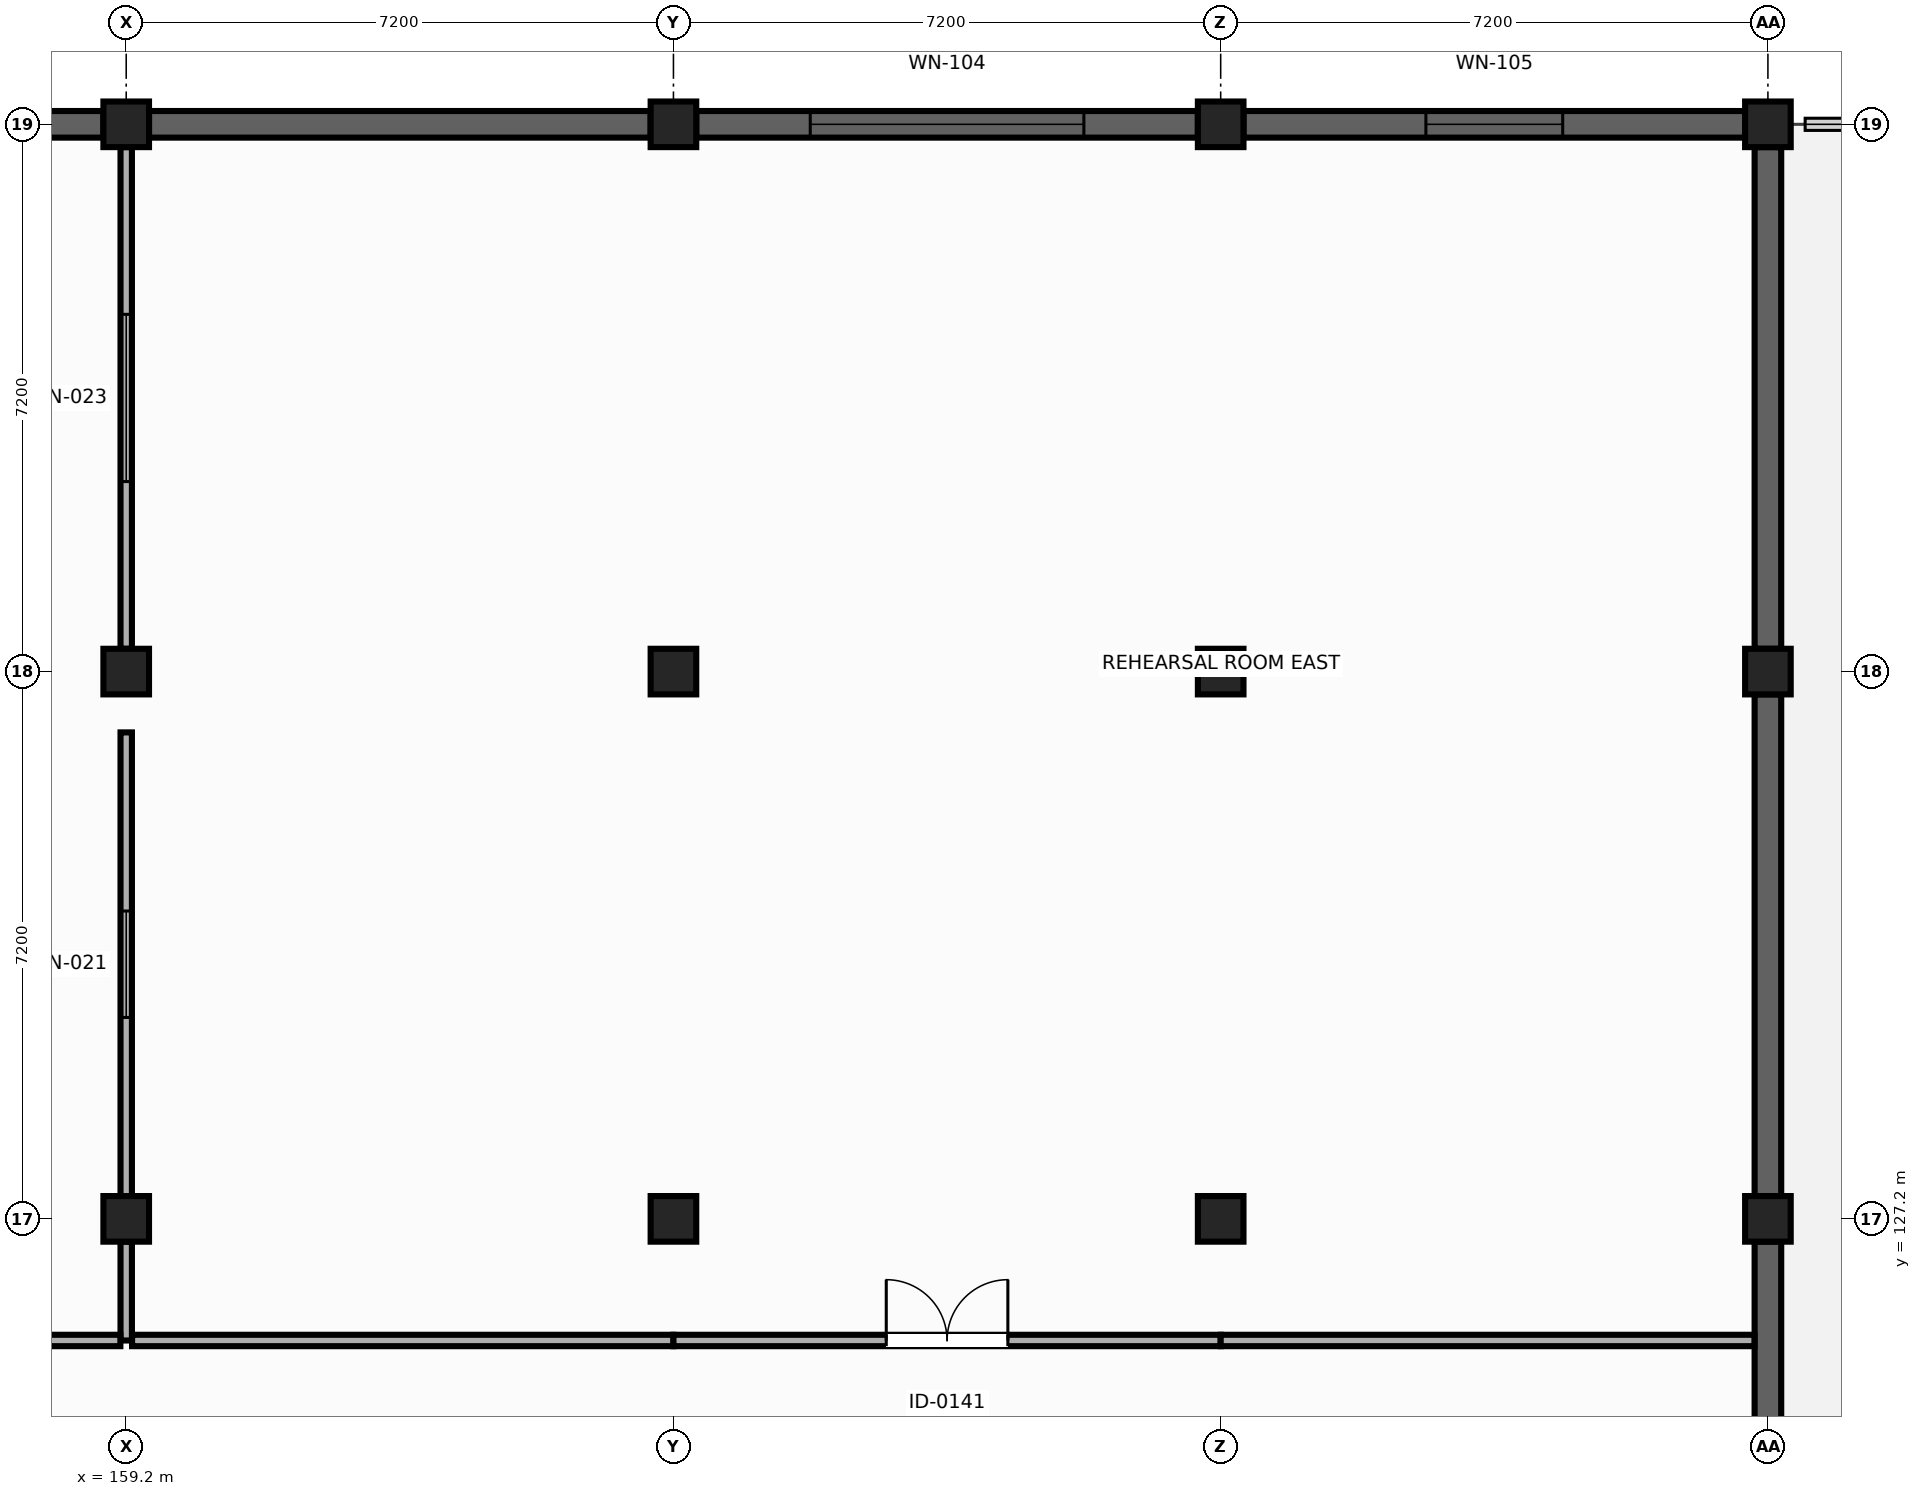
"""IFC4 building model, lengths in metres.
Left out: names, types, materials, properties, quantities, classifications, styles, units other than length and angle.
Written with IfcOpenShell. Run it as: python <this file> out.ifc"""

import sys

from ifc_helpers import new_model, si_unit, direction, frame, frame_2d, origin, origin_2d, place, context, subcontext, project, spatial, rectangle, extrude, element, fill, save


model = new_model("IFC4")
c1 = context("Model", 3, precision=1e-05, world=origin(), true_north=direction((0.0, 1.0)))
c2 = subcontext(c1, "Body", "Model", "MODEL_VIEW")
j1 = project(units=[si_unit("LENGTHUNIT", "METRE"), si_unit("PLANEANGLEUNIT", "RADIAN")], contexts=[c1])
p1 = place(None, origin())
s1 = spatial("IfcSite", under=j1, at=p1, CompositionType="ELEMENT")
p2 = place(p1, origin())
s2 = spatial("IfcBuilding", under=s1, at=p2, CompositionType="ELEMENT")
p3 = place(p2, frame((0.0, 0.0, 9.9)))
s3 = spatial("IfcBuildingStorey", under=s2, at=p3, CompositionType="ELEMENT", Elevation=9.9)
for number, where, z_axis, x_axis in (
    (1, (159.2, 127.2, 0.0), (0.0, 0.0, 1.0), (1.0, 0.0, 0.0)),
    (2, (166.4, 127.2, 0.0), (0.0, 0.0, 1.0), (0.0, 1.0, 0.0)),
):
    element("IfcColumn", number, at=place(p3, frame(where, z_axis=z_axis, x_axis=x_axis)), inside=s3, PredefinedType="COLUMN", context=c2, shape_type="SweptSolid", body=[
        extrude(rectangle(XDim=0.6, YDim=0.6, at=origin_2d()), origin(), (0.0, 0.0, 1.0), 4.5),
    ])
for number, where, z_axis, x_axis in (
    (3, (173.6, 127.2, 0.0), (0.0, 0.0, 1.0), (1.0, 0.0, 0.0)),
    (4, (180.8, 127.2, 0.0), (0.0, 0.0, 1.0), (1.0, 0.0, 0.0)),
):
    element("IfcColumn", number, at=place(p3, frame(where, z_axis=z_axis, x_axis=x_axis)), inside=s3, PredefinedType="COLUMN", context=c2, shape_type="SweptSolid", body=[
        extrude(rectangle(XDim=0.6, YDim=0.6, at=origin_2d()), origin(), (0.0, 0.0, 1.0), 7.296),
    ])
for number, where, z_axis, x_axis in (
    (5, (159.2, 134.4, 0.0), (0.0, 0.0, 1.0), (0.0, 1.0, 0.0)),
    (6, (166.4, 134.4, 0.0), (0.0, 0.0, 1.0), (1.0, 0.0, 0.0)),
):
    element("IfcColumn", number, at=place(p3, frame(where, z_axis=z_axis, x_axis=x_axis)), inside=s3, PredefinedType="COLUMN", context=c2, shape_type="SweptSolid", body=[
        extrude(rectangle(XDim=0.6, YDim=0.6, at=origin_2d()), origin(), (0.0, 0.0, 1.0), 4.5),
    ])
for number, where, z_axis, x_axis in (
    (7, (173.6, 134.4, 0.0), (0.0, 0.0, 1.0), (1.0, 0.0, 0.0)),
    (8, (180.8, 134.4, 0.0), (0.0, 0.0, 1.0), (0.0, 1.0, 0.0)),
):
    element("IfcColumn", number, at=place(p3, frame(where, z_axis=z_axis, x_axis=x_axis)), inside=s3, PredefinedType="COLUMN", context=c2, shape_type="SweptSolid", body=[
        extrude(rectangle(XDim=0.6, YDim=0.6, at=origin_2d()), origin(), (0.0, 0.0, 1.0), 5.822),
    ])
for number, where, z_axis, x_axis in (
    (9, (159.2, 141.6, 0.0), (0.0, 0.0, 1.0), (1.0, 0.0, 0.0)),
    (10, (166.4, 141.6, 0.0), (0.0, 0.0, 1.0), (1.0, 0.0, 0.0)),
):
    element("IfcColumn", number, at=place(p3, frame(where, z_axis=z_axis, x_axis=x_axis)), inside=s3, PredefinedType="COLUMN", context=c2, shape_type="SweptSolid", body=[
        extrude(rectangle(XDim=0.6, YDim=0.6, at=origin_2d()), origin(), (0.0, 0.0, 1.0), 4.5),
    ])
for number, where, z_axis, x_axis in (
    (11, (173.6, 141.6, 0.0), (0.0, 0.0, 1.0), (0.0, 1.0, 0.0)),
    (12, (180.8, 141.6, 0.0), (0.0, 0.0, 1.0), (1.0, 0.0, 0.0)),
):
    element("IfcColumn", number, at=place(p3, frame(where, z_axis=z_axis, x_axis=x_axis)), inside=s3, PredefinedType="COLUMN", context=c2, shape_type="SweptSolid", body=[
        extrude(rectangle(XDim=0.6, YDim=0.6, at=origin_2d()), origin(), (0.0, 0.0, 1.0), 4.346),
    ])
p4 = place(p3, frame((152.3, 141.6, 0.0), z_axis=(0.0, 0.0, 1.0), x_axis=(1.0, 0.0, 0.0)))
e13 = element("IfcWall", 13, at=p4, inside=s3, PredefinedType="SOLIDWALL", context=c2, shape_type="SweptSolid", body=[
    extrude(rectangle(XDim=6.6, YDim=0.35, at=frame_2d((3.3, 0.0))), origin(), (0.0, 0.0, 1.0), 4.22),
])
p5 = place(p3, frame((159.5, 141.6, 0.0), z_axis=(0.0, 0.0, 1.0), x_axis=(1.0, 0.0, 0.0)))
e14 = element("IfcWall", 14, at=p5, inside=s3, PredefinedType="SOLIDWALL", context=c2, shape_type="SweptSolid", body=[
    extrude(rectangle(XDim=6.6, YDim=0.35, at=frame_2d((3.3, 0.0))), origin(), (0.0, 0.0, 1.0), 4.22),
])
p6 = place(p3, frame((166.7, 141.6, 0.0), z_axis=(0.0, 0.0, 1.0), x_axis=(1.0, 0.0, 0.0)))
e15 = element("IfcWall", 15, at=p6, inside=s3, PredefinedType="SOLIDWALL", context=c2, shape_type="SweptSolid", body=[
    extrude(rectangle(XDim=6.6, YDim=0.35, at=frame_2d((3.3, 0.0))), origin(), (0.0, 0.0, 1.0), 4.346),
])
p7 = place(p6, frame((1.5, 0.0, 0.85)))
e16 = element("IfcOpeningElement", 16, at=p7, cuts=e15, PredefinedType="OPENING", context=c2, shape_type="SweptSolid", body=[
    extrude(rectangle(XDim=3.6, YDim=1.2, at=frame_2d((1.8, 0.6))), frame((0.0, 0.185, 0.0), z_axis=(0.0, -1.0, 0.0), x_axis=(1.0, 0.0, 0.0)), (0.0, 0.0, 1.0), 0.37),
])
p8 = place(p3, frame((173.9, 141.6, 0.0), z_axis=(0.0, 0.0, 1.0), x_axis=(1.0, 0.0, 0.0)))
e17 = element("IfcWall", 17, at=p8, inside=s3, PredefinedType="SOLIDWALL", context=c2, shape_type="SweptSolid", body=[
    extrude(rectangle(XDim=6.6, YDim=0.35, at=frame_2d((3.3, 0.0))), origin(), (0.0, 0.0, 1.0), 4.346),
])
p9 = place(p8, frame((2.4, 0.0, 0.85)))
e18 = element("IfcOpeningElement", 18, at=p9, cuts=e17, PredefinedType="OPENING", context=c2, shape_type="SweptSolid", body=[
    extrude(rectangle(XDim=1.8, YDim=1.2, at=frame_2d((0.9, 0.6))), frame((0.0, 0.185, 0.0), z_axis=(0.0, -1.0, 0.0), x_axis=(1.0, 0.0, 0.0)), (0.0, 0.0, 1.0), 0.37),
])
for number, where, z_axis, x_axis in (
    (19, (180.8, 141.3, 0.0), (0.0, 0.0, 1.0), (0.0, -1.0, 0.0)),
    (20, (180.8, 134.1, 0.0), (0.0, 0.0, 1.0), (0.0, -1.0, 0.0)),
):
    element("IfcWall", number, at=place(p3, frame(where, z_axis=z_axis, x_axis=x_axis)), inside=s3, PredefinedType="SOLIDWALL", context=c2, shape_type="SweptSolid", body=[
        extrude(rectangle(XDim=6.6, YDim=0.35, at=frame_2d((3.3, 0.0))), origin(), (0.0, 0.0, 1.0), 4.5),
    ])
p10 = place(p3, frame((180.8, 126.9, 0.0), z_axis=(0.0, 0.0, 1.0), x_axis=(0.0, -1.0, 0.0)))
e21 = element("IfcWall", 21, at=p10, inside=s3, PredefinedType="SOLIDWALL", context=c2, shape_type="SweptSolid", body=[
    extrude(rectangle(XDim=6.6, YDim=0.35, at=frame_2d((3.3, 0.0))), origin(), (0.0, 0.0, 1.0), 4.5),
])
p11 = place(p3, frame((159.2, 127.5, 0.0), z_axis=(0.0, 0.0, 1.0), x_axis=(0.0, 1.0, 0.0)))
e22 = element("IfcWall", 22, at=p11, inside=s3, PredefinedType="PARTITIONING", context=c2, shape_type="SweptSolid", body=[
    extrude(rectangle(XDim=6.1, YDim=0.15, at=frame_2d((3.05, 0.0))), origin(), (0.0, 0.0, 1.0), 3.515),
])
p12 = place(p11, frame((2.35, 0.0, 1.1)))
e23 = element("IfcOpeningElement", 23, at=p12, cuts=e22, PredefinedType="OPENING", context=c2, shape_type="SweptSolid", body=[
    extrude(rectangle(XDim=1.4, YDim=1.3, at=frame_2d((0.7, 0.65))), frame((0.0, 0.085, 0.0), z_axis=(0.0, -1.0, 0.0), x_axis=(1.0, 0.0, 0.0)), (0.0, 0.0, 1.0), 0.17),
])
p13 = place(p3, frame((159.2, 125.6, 0.0), z_axis=(0.0, 0.0, 1.0), x_axis=(0.0, 1.0, 0.0)))
e24 = element("IfcWall", 24, at=p13, inside=s3, PredefinedType="PARTITIONING", context=c2, shape_type="SweptSolid", body=[
    extrude(rectangle(XDim=1.3, YDim=0.15, at=frame_2d((0.65, 0.0))), origin(), (0.0, 0.0, 1.0), 3.515),
])
p14 = place(p3, frame((159.2, 134.7, 0.0), z_axis=(0.0, 0.0, 1.0), x_axis=(0.0, 1.0, 0.0)))
e25 = element("IfcWall", 25, at=p14, inside=s3, PredefinedType="PARTITIONING", context=c2, shape_type="SweptSolid", body=[
    extrude(rectangle(XDim=6.6, YDim=0.15, at=frame_2d((3.3, 0.0))), origin(), (0.0, 0.0, 1.0), 3.515),
])
p15 = place(p14, frame((2.2, 0.0, 1.1)))
e26 = element("IfcOpeningElement", 26, at=p15, cuts=e25, PredefinedType="OPENING", context=c2, shape_type="SweptSolid", body=[
    extrude(rectangle(XDim=2.2, YDim=1.3, at=frame_2d((1.1, 0.65))), frame((0.0, 0.085, 0.0), z_axis=(0.0, -1.0, 0.0), x_axis=(1.0, 0.0, 0.0)), (0.0, 0.0, 1.0), 0.17),
])
p16 = place(p3, frame((152.0, 125.6, 0.0), z_axis=(0.0, 0.0, 1.0), x_axis=(1.0, 0.0, 0.0)))
e27 = element("IfcWall", 27, at=p16, inside=s3, PredefinedType="PARTITIONING", context=c2, shape_type="SweptSolid", body=[
    extrude(rectangle(XDim=7.123, YDim=0.15, at=frame_2d((3.562, 0.0))), origin(), (0.0, 0.0, 1.0), 3.515),
])
p17 = place(p3, frame((159.277, 125.6, 0.0), z_axis=(0.0, 0.0, 1.0), x_axis=(1.0, 0.0, 0.0)))
e28 = element("IfcWall", 28, at=p17, inside=s3, PredefinedType="PARTITIONING", context=c2, shape_type="SweptSolid", body=[
    extrude(rectangle(XDim=7.123, YDim=0.15, at=frame_2d((3.562, 0.0))), origin(), (0.0, 0.0, 1.0), 3.515),
])
p18 = place(p3, frame((166.4, 125.6, 0.0), z_axis=(0.0, 0.0, 1.0), x_axis=(1.0, 0.0, 0.0)))
e29 = element("IfcWall", 29, at=p18, inside=s3, PredefinedType="PARTITIONING", context=c2, shape_type="SweptSolid", body=[
    extrude(rectangle(XDim=7.2, YDim=0.15, at=frame_2d((3.6, 0.0))), origin(), (0.0, 0.0, 1.0), 3.515),
])
p19 = place(p18, frame((2.8, 0.0, 0.0)))
e30 = element("IfcOpeningElement", 30, at=p19, cuts=e29, PredefinedType="OPENING", context=c2, shape_type="SweptSolid", body=[
    extrude(rectangle(XDim=1.6, YDim=2.25, at=frame_2d((0.8, 1.125))), frame((0.0, 0.085, 0.0), z_axis=(0.0, -1.0, 0.0), x_axis=(1.0, 0.0, 0.0)), (0.0, 0.0, 1.0), 0.17),
])
p20 = place(p3, frame((173.6, 125.6, 0.0), z_axis=(0.0, 0.0, 1.0), x_axis=(1.0, 0.0, 0.0)))
e31 = element("IfcWall", 31, at=p20, inside=s3, PredefinedType="PARTITIONING", context=c2, shape_type="SweptSolid", body=[
    extrude(rectangle(XDim=7.023, YDim=0.15, at=frame_2d((3.511, 0.0))), origin(), (0.0, 0.0, 1.0), 6.969),
])
p21 = place(p7, origin())
e32 = element("IfcWindow", 32, at=p21, inside=s3, PartitioningType="SINGLE_PANEL", PredefinedType="WINDOW", context=c2, shape_type="SweptSolid", body=[
    extrude(rectangle(XDim=3.6, YDim=1.2, at=frame_2d((1.8, 0.6))), frame((0.0, 0.03, 0.0), z_axis=(0.0, -1.0, 0.0), x_axis=(1.0, 0.0, 0.0)), (0.0, 0.0, 1.0), 0.06),
])
fill(e16, e32)
p22 = place(p9, origin())
e33 = element("IfcWindow", 33, at=p22, inside=s3, PartitioningType="SINGLE_PANEL", PredefinedType="WINDOW", context=c2, shape_type="SweptSolid", body=[
    extrude(rectangle(XDim=1.8, YDim=1.2, at=frame_2d((0.9, 0.6))), frame((0.0, 0.03, 0.0), z_axis=(0.0, -1.0, 0.0), x_axis=(1.0, 0.0, 0.0)), (0.0, 0.0, 1.0), 0.06),
])
fill(e18, e33)
p23 = place(p12, origin())
e34 = element("IfcWindow", 34, at=p23, inside=s3, PartitioningType="SINGLE_PANEL", PredefinedType="WINDOW", context=c2, shape_type="SweptSolid", body=[
    extrude(rectangle(XDim=1.4, YDim=1.3, at=frame_2d((0.7, 0.65))), frame((0.0, 0.03, 0.0), z_axis=(0.0, -1.0, 0.0), x_axis=(1.0, 0.0, 0.0)), (0.0, 0.0, 1.0), 0.06),
])
fill(e23, e34)
p24 = place(p19, origin())
e35 = element("IfcDoor", 35, at=p24, inside=s3, OperationType="DOUBLE_DOOR_SINGLE_SWING", PredefinedType="DOOR", context=c2, shape_type="SweptSolid", body=[
    extrude(rectangle(XDim=1.6, YDim=2.25, at=frame_2d((0.8, 1.125))), frame((0.0, 0.025, 0.0), z_axis=(0.0, -1.0, 0.0), x_axis=(1.0, 0.0, 0.0)), (0.0, 0.0, 1.0), 0.05),
])
fill(e30, e35)
p25 = place(p15, origin())
e36 = element("IfcWindow", 36, at=p25, inside=s3, PartitioningType="SINGLE_PANEL", PredefinedType="WINDOW", context=c2, shape_type="SweptSolid", body=[
    extrude(rectangle(XDim=2.2, YDim=1.3, at=frame_2d((1.1, 0.65))), frame((0.0, 0.03, 0.0), z_axis=(0.0, -1.0, 0.0), x_axis=(1.0, 0.0, 0.0)), (0.0, 0.0, 1.0), 0.06),
])
fill(e26, e36)
save(model, sys.argv[1])
